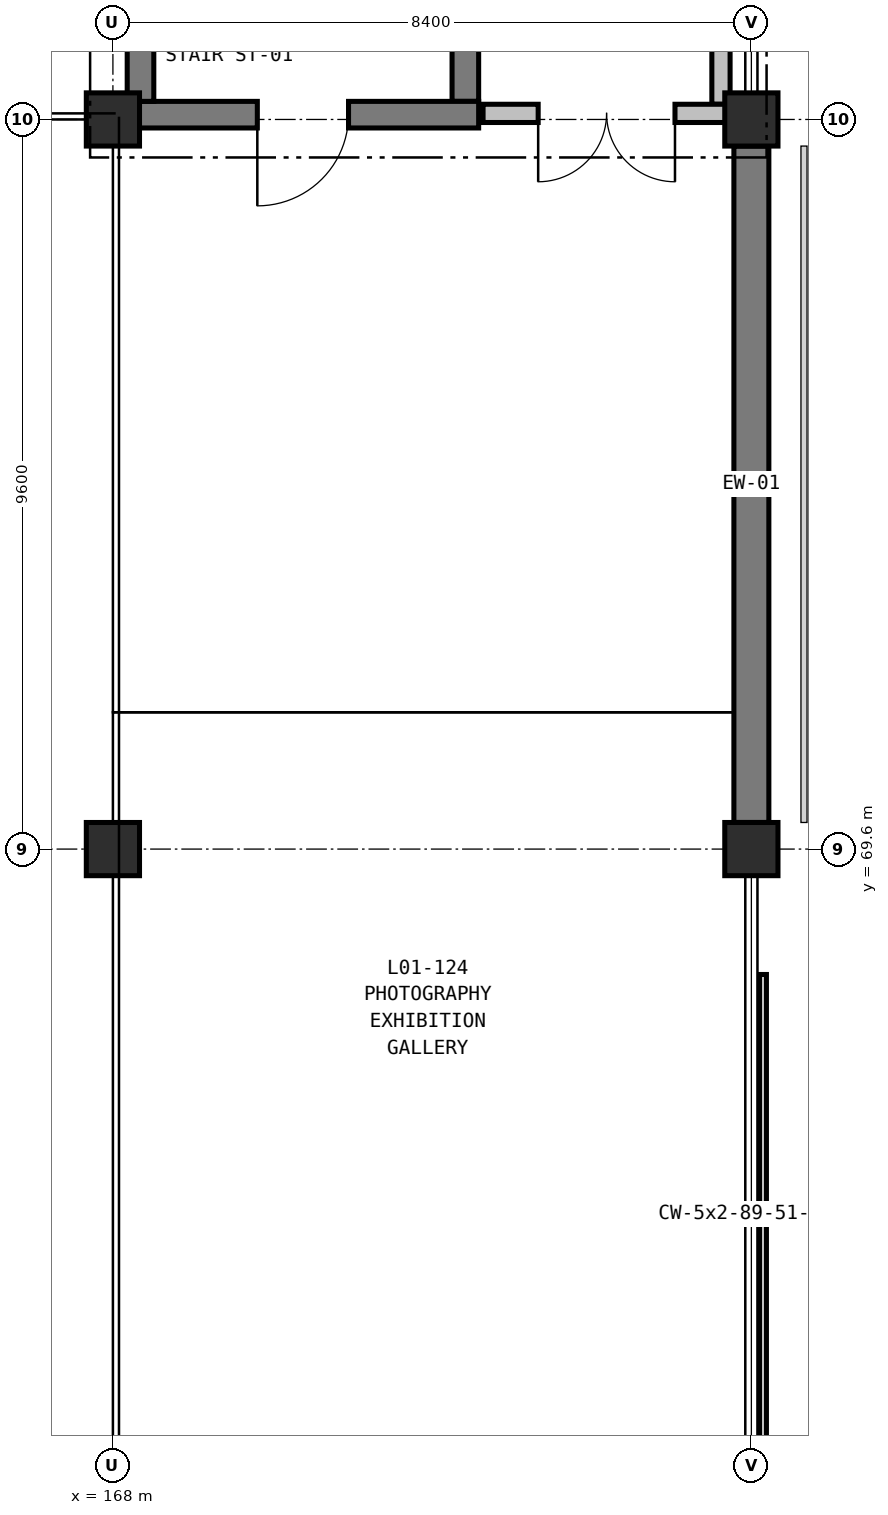
"""IFC4 building model, lengths in metres.
Left out: names, types, materials, properties, quantities, classifications, styles, units other than length and angle.
Written with IfcOpenShell. Run it as: python <this file> out.ifc"""

import sys

from ifc_helpers import new_model, si_unit, direction, frame, frame_2d, origin, origin_2d, place, context, subcontext, project, spatial, rectangle, extrude, element, fill, save


model = new_model("IFC4")
c1 = context("Model", 3, precision=1e-05, world=origin(), true_north=direction((0.0, 1.0)))
c2 = subcontext(c1, "Body", "Model", "MODEL_VIEW")
j1 = project(units=[si_unit("LENGTHUNIT", "METRE"), si_unit("PLANEANGLEUNIT", "RADIAN")], contexts=[c1])
p1 = place(None, origin())
s1 = spatial("IfcSite", under=j1, at=p1, CompositionType="ELEMENT")
p2 = place(p1, origin())
s2 = spatial("IfcBuilding", under=s1, at=p2, CompositionType="ELEMENT")
p3 = place(p2, frame((0.0, 0.0, 6.0)))
s3 = spatial("IfcBuildingStorey", under=s2, at=p3, CompositionType="ELEMENT", Elevation=6.0)
for number, where, z_axis, x_axis in (
    (1, (168.0, 69.6, 0.0), (0.0, 0.0, 1.0), (1.0, 0.0, 0.0)),
    (2, (168.0, 79.2, 0.0), (0.0, 0.0, 1.0), (1.0, 0.0, 0.0)),
    (3, (176.4, 69.6, 0.0), (0.0, 0.0, 1.0), (1.0, 0.0, 0.0)),
    (4, (176.4, 79.2, 0.0), (0.0, 0.0, 1.0), (1.0, 0.0, 0.0)),
):
    element("IfcColumn", number, at=place(p3, frame(where, z_axis=z_axis, x_axis=x_axis)), inside=s3, PredefinedType="COLUMN", context=c2, shape_type="SweptSolid", body=[
        extrude(rectangle(XDim=0.7, YDim=0.7, at=origin_2d()), origin(), (0.0, 0.0, 1.0), 5.4),
    ])
p4 = place(p3, frame((176.4, 78.85, 0.0), z_axis=(0.0, 0.0, 1.0), x_axis=(0.0, -1.0, 0.0)))
e5 = element("IfcWall", 5, at=p4, inside=s3, PredefinedType="SOLIDWALL", context=c2, shape_type="SweptSolid", body=[
    extrude(rectangle(XDim=8.9, YDim=0.46, at=frame_2d((4.45, 0.0))), origin(), (0.0, 0.0, 1.0), 5.08),
])
p5 = place(p3, frame((172.637, 88.562, 0.0), z_axis=(0.0, 0.0, 1.0), x_axis=(0.0, -1.0, 0.0)))
e6 = element("IfcWall", 6, at=p5, inside=s3, PredefinedType="SHEAR", context=c2, shape_type="SweptSolid", body=[
    extrude(rectangle(XDim=9.124, YDim=0.35, at=frame_2d((4.562, 0.0))), origin(), (0.0, 0.0, 1.0), 5.08),
])
p6 = place(p3, frame((172.812, 79.263, 0.0), z_axis=(0.0, 0.0, 1.0), x_axis=(-1.0, 0.0, 0.0)))
e7 = element("IfcWall", 7, at=p6, inside=s3, PredefinedType="SHEAR", context=c2, shape_type="SweptSolid", body=[
    extrude(rectangle(XDim=4.624, YDim=0.35, at=frame_2d((2.312, 0.0))), origin(), (0.0, 0.0, 1.0), 5.08),
])
p7 = place(p6, frame((1.712, 0.0, 0.0)))
e8 = element("IfcOpeningElement", 8, at=p7, cuts=e7, PredefinedType="OPENING", context=c2, shape_type="SweptSolid", body=[
    extrude(rectangle(XDim=1.2, YDim=2.2, at=frame_2d((0.6, 1.1))), frame((0.0, 0.185, 0.0), z_axis=(0.0, -1.0, 0.0), x_axis=(1.0, 0.0, 0.0)), (0.0, 0.0, 1.0), 0.37),
])
p8 = place(p3, frame((168.363, 79.438, 0.0), z_axis=(0.0, 0.0, 1.0), x_axis=(0.0, 1.0, 0.0)))
e9 = element("IfcWall", 9, at=p8, inside=s3, PredefinedType="SHEAR", context=c2, shape_type="SweptSolid", body=[
    extrude(rectangle(XDim=9.124, YDim=0.35, at=frame_2d((4.562, 0.0))), origin(), (0.0, 0.0, 1.0), 5.08),
])
p9 = place(p3, frame((176.0, 84.9, 0.0), z_axis=(0.0, 0.0, 1.0), x_axis=(0.0, -1.0, 0.0)))
e10 = element("IfcWall", 10, at=p9, inside=s3, PredefinedType="PARTITIONING", context=c2, shape_type="SweptSolid", body=[
    extrude(rectangle(XDim=5.5, YDim=0.24, at=frame_2d((2.75, 0.0))), origin(), (0.0, 0.0, 1.0), 4.405),
])
p10 = place(p3, frame((176.12, 79.28, 0.0), z_axis=(0.0, 0.0, 1.0), x_axis=(-1.0, 0.0, 0.0)))
e11 = element("IfcWall", 11, at=p10, inside=s3, PredefinedType="PARTITIONING", context=c2, shape_type="SweptSolid", body=[
    extrude(rectangle(XDim=3.25, YDim=0.24, at=frame_2d((1.625, 0.0))), origin(), (0.0, 0.0, 1.0), 4.405),
])
p11 = place(p10, frame((0.725, 0.0, 0.0)))
e12 = element("IfcOpeningElement", 12, at=p11, cuts=e11, PredefinedType="OPENING", context=c2, shape_type="SweptSolid", body=[
    extrude(rectangle(XDim=1.8, YDim=2.25, at=frame_2d((0.9, 1.125))), frame((0.0, 0.13, 0.0), z_axis=(0.0, -1.0, 0.0), x_axis=(1.0, 0.0, 0.0)), (0.0, 0.0, 1.0), 0.26),
])
p12 = place(p7, origin())
e13 = element("IfcDoor", 13, at=p12, inside=s3, OperationType="SINGLE_SWING_RIGHT", PredefinedType="DOOR", context=c2, shape_type="SweptSolid", body=[
    extrude(rectangle(XDim=1.2, YDim=2.2, at=frame_2d((0.6, 1.1))), frame((0.0, 0.025, 0.0), z_axis=(0.0, -1.0, 0.0), x_axis=(1.0, 0.0, 0.0)), (0.0, 0.0, 1.0), 0.05),
])
fill(e8, e13)
p13 = place(p11, origin())
e14 = element("IfcDoor", 14, at=p13, inside=s3, OperationType="DOUBLE_DOOR_SINGLE_SWING", PredefinedType="DOOR", context=c2, shape_type="SweptSolid", body=[
    extrude(rectangle(XDim=1.8, YDim=2.25, at=frame_2d((0.9, 1.125))), frame((0.0, 0.025, 0.0), z_axis=(0.0, -1.0, 0.0), x_axis=(1.0, 0.0, 0.0)), (0.0, 0.0, 1.0), 0.05),
])
fill(e12, e14)
save(model, sys.argv[1])
